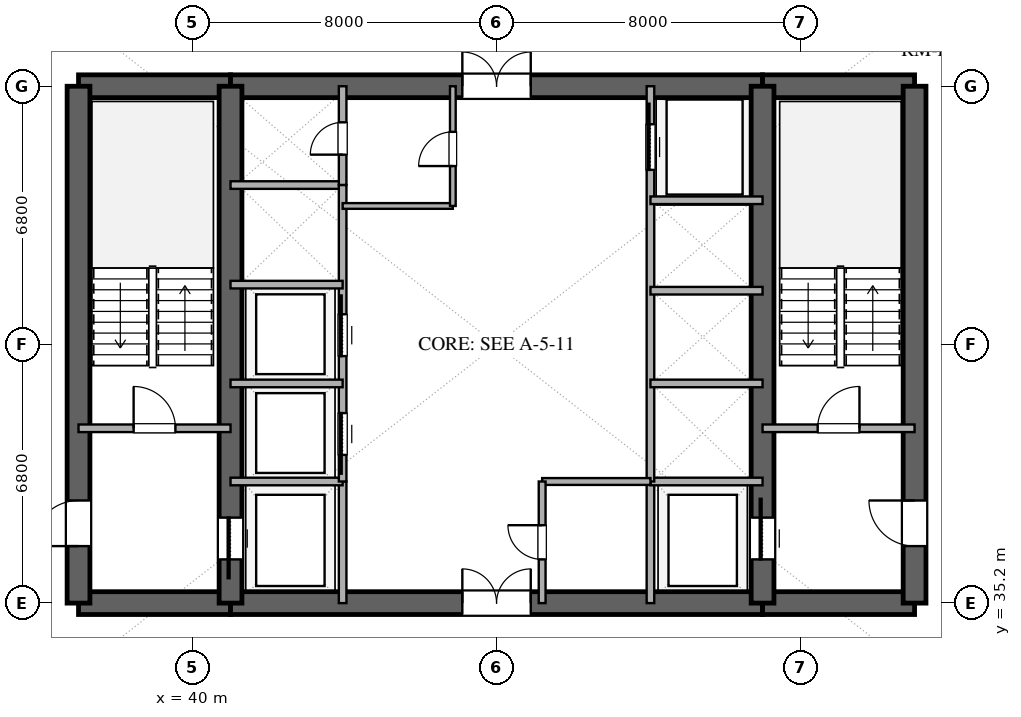
"""IFC4 building model, lengths in metres.
Left out: names, types, materials, properties, quantities, classifications, styles, units other than length and angle.
Written with IfcOpenShell. Run it as: python <this file> out.ifc"""

import sys

from ifc_helpers import new_model, si_unit, direction, frame, frame_2d, origin, place, context, subcontext, project, spatial, rectangle, extrude, element, fill, save


model = new_model("IFC4")
c1 = context("Model", 3, precision=1e-05, world=origin(), true_north=direction((0.0, 1.0)))
c2 = subcontext(c1, "Body", "Model", "MODEL_VIEW")
j1 = project(units=[si_unit("LENGTHUNIT", "METRE"), si_unit("PLANEANGLEUNIT", "RADIAN")], contexts=[c1])
p1 = place(None, origin())
s1 = spatial("IfcSite", under=j1, at=p1, CompositionType="ELEMENT")
p2 = place(p1, origin())
s2 = spatial("IfcBuilding", under=s1, at=p2, CompositionType="ELEMENT")
p3 = place(p2, frame((0.0, 0.0, 53.4)))
s3 = spatial("IfcBuildingStorey", under=s2, at=p3, CompositionType="ELEMENT", Elevation=53.4)
p4 = place(p3, frame((37.0, 35.2, 0.0), z_axis=(0.0, 0.0, 1.0), x_axis=(1.0, 0.0, 0.0)))
e1 = element("IfcWall", 1, at=p4, inside=s3, PredefinedType="SHEAR", context=c2, shape_type="SweptSolid", body=[
    extrude(rectangle(XDim=4.0, YDim=0.6, at=frame_2d((2.0, 0.0))), origin(), (0.0, 0.0, 1.0), 3.38),
])
p5 = place(p3, frame((41.0, 35.2, 0.0), z_axis=(0.0, 0.0, 1.0), x_axis=(1.0, 0.0, 0.0)))
e2 = element("IfcWall", 2, at=p5, inside=s3, PredefinedType="SHEAR", context=c2, shape_type="SweptSolid", body=[
    extrude(rectangle(XDim=14.0, YDim=0.6, at=frame_2d((7.0, 0.0))), origin(), (0.0, 0.0, 1.0), 3.38),
])
p6 = place(p5, frame((6.1, 0.0, 0.0)))
e3 = element("IfcOpeningElement", 3, at=p6, cuts=e2, PredefinedType="OPENING", context=c2, shape_type="SweptSolid", body=[
    extrude(rectangle(XDim=1.8, YDim=2.25, at=frame_2d((0.9, 1.125))), frame((0.0, 0.31, 0.0), z_axis=(0.0, -1.0, 0.0), x_axis=(1.0, 0.0, 0.0)), (0.0, 0.0, 1.0), 0.62),
])
for number, where, z_axis, x_axis in (
    (4, (55.0, 35.2, 0.0), (0.0, 0.0, 1.0), (1.0, 0.0, 0.0)),
    (5, (37.0, 48.8, 0.0), (0.0, 0.0, 1.0), (1.0, 0.0, 0.0)),
):
    element("IfcWall", number, at=place(p3, frame(where, z_axis=z_axis, x_axis=x_axis)), inside=s3, PredefinedType="SHEAR", context=c2, shape_type="SweptSolid", body=[
        extrude(rectangle(XDim=4.0, YDim=0.6, at=frame_2d((2.0, 0.0))), origin(), (0.0, 0.0, 1.0), 3.38),
    ])
p7 = place(p3, frame((41.0, 48.8, 0.0), z_axis=(0.0, 0.0, 1.0), x_axis=(1.0, 0.0, 0.0)))
e6 = element("IfcWall", 6, at=p7, inside=s3, PredefinedType="SHEAR", context=c2, shape_type="SweptSolid", body=[
    extrude(rectangle(XDim=14.0, YDim=0.6, at=frame_2d((7.0, 0.0))), origin(), (0.0, 0.0, 1.0), 3.38),
])
p8 = place(p7, frame((6.1, 0.0, 0.0)))
e7 = element("IfcOpeningElement", 7, at=p8, cuts=e6, PredefinedType="OPENING", context=c2, shape_type="SweptSolid", body=[
    extrude(rectangle(XDim=1.8, YDim=2.25, at=frame_2d((0.9, 1.125))), frame((0.0, 0.31, 0.0), z_axis=(0.0, -1.0, 0.0), x_axis=(1.0, 0.0, 0.0)), (0.0, 0.0, 1.0), 0.62),
])
p9 = place(p3, frame((55.0, 48.8, 0.0), z_axis=(0.0, 0.0, 1.0), x_axis=(1.0, 0.0, 0.0)))
e8 = element("IfcWall", 8, at=p9, inside=s3, PredefinedType="SHEAR", context=c2, shape_type="SweptSolid", body=[
    extrude(rectangle(XDim=4.0, YDim=0.6, at=frame_2d((2.0, 0.0))), origin(), (0.0, 0.0, 1.0), 3.38),
])
p10 = place(p3, frame((37.0, 35.2, 0.0), z_axis=(0.0, 0.0, 1.0), x_axis=(0.0, 1.0, 0.0)))
e9 = element("IfcWall", 9, at=p10, inside=s3, PredefinedType="SHEAR", context=c2, shape_type="SweptSolid", body=[
    extrude(rectangle(XDim=13.6, YDim=0.6, at=frame_2d((6.8, 0.0))), origin(), (0.0, 0.0, 1.0), 3.38),
])
p11 = place(p10, frame((1.5, 0.0, 0.0)))
e10 = element("IfcOpeningElement", 10, at=p11, cuts=e9, PredefinedType="OPENING", context=c2, shape_type="SweptSolid", body=[
    extrude(rectangle(XDim=1.2, YDim=2.15, at=frame_2d((0.6, 1.075))), frame((0.0, 0.31, 0.0), z_axis=(0.0, -1.0, 0.0), x_axis=(1.0, 0.0, 0.0)), (0.0, 0.0, 1.0), 0.62),
])
p12 = place(p3, frame((59.0, 35.2, 0.0), z_axis=(0.0, 0.0, 1.0), x_axis=(0.0, 1.0, 0.0)))
e11 = element("IfcWall", 11, at=p12, inside=s3, PredefinedType="SHEAR", context=c2, shape_type="SweptSolid", body=[
    extrude(rectangle(XDim=13.6, YDim=0.6, at=frame_2d((6.8, 0.0))), origin(), (0.0, 0.0, 1.0), 3.38),
])
p13 = place(p12, frame((1.5, 0.0, 0.0)))
e12 = element("IfcOpeningElement", 12, at=p13, cuts=e11, PredefinedType="OPENING", context=c2, shape_type="SweptSolid", body=[
    extrude(rectangle(XDim=1.2, YDim=2.15, at=frame_2d((0.6, 1.075))), frame((0.0, 0.31, 0.0), z_axis=(0.0, -1.0, 0.0), x_axis=(1.0, 0.0, 0.0)), (0.0, 0.0, 1.0), 0.62),
])
p14 = place(p3, frame((41.0, 35.2, 0.0), z_axis=(0.0, 0.0, 1.0), x_axis=(0.0, 1.0, 0.0)))
e13 = element("IfcWall", 13, at=p14, inside=s3, PredefinedType="SHEAR", context=c2, shape_type="SweptSolid", body=[
    extrude(rectangle(XDim=13.6, YDim=0.6, at=frame_2d((6.8, 0.0))), origin(), (0.0, 0.0, 1.0), 3.38),
])
p15 = place(p14, frame((1.15, 0.0, 0.0)))
e14 = element("IfcOpeningElement", 14, at=p15, cuts=e13, PredefinedType="OPENING", context=c2, shape_type="SweptSolid", body=[
    extrude(rectangle(XDim=1.1, YDim=2.2, at=frame_2d((0.55, 1.1))), frame((0.0, 0.31, 0.0), z_axis=(0.0, -1.0, 0.0), x_axis=(1.0, 0.0, 0.0)), (0.0, 0.0, 1.0), 0.62),
])
p16 = place(p3, frame((55.0, 35.2, 0.0), z_axis=(0.0, 0.0, 1.0), x_axis=(0.0, 1.0, 0.0)))
e15 = element("IfcWall", 15, at=p16, inside=s3, PredefinedType="SHEAR", context=c2, shape_type="SweptSolid", body=[
    extrude(rectangle(XDim=13.6, YDim=0.6, at=frame_2d((6.8, 0.0))), origin(), (0.0, 0.0, 1.0), 3.38),
])
p17 = place(p16, frame((1.15, 0.0, 0.0)))
e16 = element("IfcOpeningElement", 16, at=p17, cuts=e15, PredefinedType="OPENING", context=c2, shape_type="SweptSolid", body=[
    extrude(rectangle(XDim=1.1, YDim=2.2, at=frame_2d((0.55, 1.1))), frame((0.0, 0.31, 0.0), z_axis=(0.0, -1.0, 0.0), x_axis=(1.0, 0.0, 0.0)), (0.0, 0.0, 1.0), 0.62),
])
p18 = place(p3, frame((37.0, 39.8, 0.0), z_axis=(0.0, 0.0, 1.0), x_axis=(1.0, 0.0, 0.0)))
e17 = element("IfcWall", 17, at=p18, inside=s3, PredefinedType="SOLIDWALL", context=c2, shape_type="SweptSolid", body=[
    extrude(rectangle(XDim=4.0, YDim=0.2, at=frame_2d((2.0, 0.0))), origin(), (0.0, 0.0, 1.0), 2.74),
])
p19 = place(p18, frame((1.45, 0.0, 0.0)))
e18 = element("IfcOpeningElement", 18, at=p19, cuts=e17, PredefinedType="OPENING", context=c2, shape_type="SweptSolid", body=[
    extrude(rectangle(XDim=1.1, YDim=2.15, at=frame_2d((0.55, 1.075))), frame((0.0, 0.11, 0.0), z_axis=(0.0, -1.0, 0.0), x_axis=(1.0, 0.0, 0.0)), (0.0, 0.0, 1.0), 0.22),
])
p20 = place(p3, frame((55.0, 39.8, 0.0), z_axis=(0.0, 0.0, 1.0), x_axis=(1.0, 0.0, 0.0)))
e19 = element("IfcWall", 19, at=p20, inside=s3, PredefinedType="SOLIDWALL", context=c2, shape_type="SweptSolid", body=[
    extrude(rectangle(XDim=4.0, YDim=0.2, at=frame_2d((2.0, 0.0))), origin(), (0.0, 0.0, 1.0), 2.74),
])
p21 = place(p20, frame((1.45, 0.0, 0.0)))
e20 = element("IfcOpeningElement", 20, at=p21, cuts=e19, PredefinedType="OPENING", context=c2, shape_type="SweptSolid", body=[
    extrude(rectangle(XDim=1.1, YDim=2.15, at=frame_2d((0.55, 1.075))), frame((0.0, 0.11, 0.0), z_axis=(0.0, -1.0, 0.0), x_axis=(1.0, 0.0, 0.0)), (0.0, 0.0, 1.0), 0.22),
])
p22 = place(p3, frame((43.95, 35.2, 0.0), z_axis=(0.0, 0.0, 1.0), x_axis=(0.0, 1.0, 0.0)))
e21 = element("IfcWall", 21, at=p22, inside=s3, PredefinedType="SOLIDWALL", context=c2, shape_type="SweptSolid", body=[
    extrude(rectangle(XDim=3.2, YDim=0.2, at=frame_2d((1.6, 0.0))), origin(), (0.0, 0.0, 1.0), 2.74),
])
p23 = place(p3, frame((41.0, 38.4, 0.0), z_axis=(0.0, 0.0, 1.0), x_axis=(1.0, 0.0, 0.0)))
e22 = element("IfcWall", 22, at=p23, inside=s3, PredefinedType="SOLIDWALL", context=c2, shape_type="SweptSolid", body=[
    extrude(rectangle(XDim=2.95, YDim=0.2, at=frame_2d((1.475, 0.0))), origin(), (0.0, 0.0, 1.0), 2.74),
])
p24 = place(p3, frame((52.05, 35.2, 0.0), z_axis=(0.0, 0.0, 1.0), x_axis=(0.0, 1.0, 0.0)))
e23 = element("IfcWall", 23, at=p24, inside=s3, PredefinedType="SOLIDWALL", context=c2, shape_type="SweptSolid", body=[
    extrude(rectangle(XDim=3.2, YDim=0.2, at=frame_2d((1.6, 0.0))), origin(), (0.0, 0.0, 1.0), 2.74),
])
for number, where, z_axis, x_axis in (
    (24, (52.05, 38.4, 0.0), (0.0, 0.0, 1.0), (1.0, 0.0, 0.0)),
    (25, (41.0, 46.2, 0.0), (0.0, 0.0, 1.0), (1.0, 0.0, 0.0)),
):
    element("IfcWall", number, at=place(p3, frame(where, z_axis=z_axis, x_axis=x_axis)), inside=s3, PredefinedType="SOLIDWALL", context=c2, shape_type="SweptSolid", body=[
        extrude(rectangle(XDim=2.95, YDim=0.2, at=frame_2d((1.475, 0.0))), origin(), (0.0, 0.0, 1.0), 2.74),
    ])
p25 = place(p3, frame((43.95, 46.2, 0.0), z_axis=(0.0, 0.0, 1.0), x_axis=(0.0, 1.0, 0.0)))
e26 = element("IfcWall", 26, at=p25, inside=s3, PredefinedType="SOLIDWALL", context=c2, shape_type="SweptSolid", body=[
    extrude(rectangle(XDim=2.6, YDim=0.2, at=frame_2d((1.3, 0.0))), origin(), (0.0, 0.0, 1.0), 2.74),
])
p26 = place(p25, frame((0.8, 0.0, 0.0)))
e27 = element("IfcOpeningElement", 27, at=p26, cuts=e26, PredefinedType="OPENING", context=c2, shape_type="SweptSolid", body=[
    extrude(rectangle(XDim=0.85, YDim=2.15, at=frame_2d((0.425, 1.075))), frame((0.0, 0.11, 0.0), z_axis=(0.0, -1.0, 0.0), x_axis=(1.0, 0.0, 0.0)), (0.0, 0.0, 1.0), 0.22),
])
p27 = place(p3, frame((43.95, 38.4, 0.0), z_axis=(0.0, 0.0, 1.0), x_axis=(0.0, 1.0, 0.0)))
e28 = element("IfcWall", 28, at=p27, inside=s3, PredefinedType="SOLIDWALL", context=c2, shape_type="SweptSolid", body=[
    extrude(rectangle(XDim=7.8, YDim=0.2, at=frame_2d((3.9, 0.0))), origin(), (0.0, 0.0, 1.0), 2.74),
])
p28 = place(p27, frame((0.7, 0.0, 0.0)))
e29 = element("IfcOpeningElement", 29, at=p28, cuts=e28, PredefinedType="OPENING", context=c2, shape_type="SweptSolid", body=[
    extrude(rectangle(XDim=1.1, YDim=2.2, at=frame_2d((0.55, 1.1))), frame((0.0, 0.11, 0.0), z_axis=(0.0, -1.0, 0.0), x_axis=(1.0, 0.0, 0.0)), (0.0, 0.0, 1.0), 0.22),
])
p29 = place(p27, frame((3.3, 0.0, 0.0)))
e30 = element("IfcOpeningElement", 30, at=p29, cuts=e28, PredefinedType="OPENING", context=c2, shape_type="SweptSolid", body=[
    extrude(rectangle(XDim=1.1, YDim=2.2, at=frame_2d((0.55, 1.1))), frame((0.0, 0.11, 0.0), z_axis=(0.0, -1.0, 0.0), x_axis=(1.0, 0.0, 0.0)), (0.0, 0.0, 1.0), 0.22),
])
for number, where, z_axis, x_axis in (
    (31, (41.0, 40.98, 0.0), (0.0, 0.0, 1.0), (1.0, 0.0, 0.0)),
    (32, (41.0, 43.58, 0.0), (0.0, 0.0, 1.0), (1.0, 0.0, 0.0)),
):
    element("IfcWall", number, at=place(p3, frame(where, z_axis=z_axis, x_axis=x_axis)), inside=s3, PredefinedType="SOLIDWALL", context=c2, shape_type="SweptSolid", body=[
        extrude(rectangle(XDim=2.95, YDim=0.2, at=frame_2d((1.475, 0.0))), origin(), (0.0, 0.0, 1.0), 2.74),
    ])
p30 = place(p3, frame((52.05, 38.4, 0.0), z_axis=(0.0, 0.0, 1.0), x_axis=(0.0, 1.0, 0.0)))
e33 = element("IfcWall", 33, at=p30, inside=s3, PredefinedType="SOLIDWALL", context=c2, shape_type="SweptSolid", body=[
    extrude(rectangle(XDim=10.4, YDim=0.2, at=frame_2d((5.2, 0.0))), origin(), (0.0, 0.0, 1.0), 2.74),
])
p31 = place(p30, frame((8.2, 0.0, 0.0)))
e34 = element("IfcOpeningElement", 34, at=p31, cuts=e33, PredefinedType="OPENING", context=c2, shape_type="SweptSolid", body=[
    extrude(rectangle(XDim=1.2, YDim=2.2, at=frame_2d((0.6, 1.1))), frame((0.0, 0.11, 0.0), z_axis=(0.0, -1.0, 0.0), x_axis=(1.0, 0.0, 0.0)), (0.0, 0.0, 1.0), 0.22),
])
for number, where, z_axis, x_axis in (
    (35, (52.05, 40.98, 0.0), (0.0, 0.0, 1.0), (1.0, 0.0, 0.0)),
    (36, (52.05, 43.42, 0.0), (0.0, 0.0, 1.0), (1.0, 0.0, 0.0)),
    (37, (52.05, 45.8, 0.0), (0.0, 0.0, 1.0), (1.0, 0.0, 0.0)),
):
    element("IfcWall", number, at=place(p3, frame(where, z_axis=z_axis, x_axis=x_axis)), inside=s3, PredefinedType="SOLIDWALL", context=c2, shape_type="SweptSolid", body=[
        extrude(rectangle(XDim=2.95, YDim=0.2, at=frame_2d((1.475, 0.0))), origin(), (0.0, 0.0, 1.0), 2.74),
    ])
p32 = place(p3, frame((43.95, 45.65, 0.0), z_axis=(0.0, 0.0, 1.0), x_axis=(1.0, 0.0, 0.0)))
e38 = element("IfcWall", 38, at=p32, inside=s3, PredefinedType="PARTITIONING", context=c2, shape_type="SweptSolid", body=[
    extrude(rectangle(XDim=2.9, YDim=0.15, at=frame_2d((1.45, 0.0))), origin(), (0.0, 0.0, 1.0), 2.74),
])
p33 = place(p3, frame((46.85, 45.65, 0.0), z_axis=(0.0, 0.0, 1.0), x_axis=(0.0, 1.0, 0.0)))
e39 = element("IfcWall", 39, at=p33, inside=s3, PredefinedType="PARTITIONING", context=c2, shape_type="SweptSolid", body=[
    extrude(rectangle(XDim=3.15, YDim=0.15, at=frame_2d((1.575, 0.0))), origin(), (0.0, 0.0, 1.0), 2.74),
])
p34 = place(p33, frame((1.05, 0.0, 0.0)))
e40 = element("IfcOpeningElement", 40, at=p34, cuts=e39, PredefinedType="OPENING", context=c2, shape_type="SweptSolid", body=[
    extrude(rectangle(XDim=0.9, YDim=2.15, at=frame_2d((0.45, 1.075))), frame((0.0, 0.085, 0.0), z_axis=(0.0, -1.0, 0.0), x_axis=(1.0, 0.0, 0.0)), (0.0, 0.0, 1.0), 0.17),
])
p35 = place(p3, frame((49.2, 38.4, 0.0), z_axis=(0.0, 0.0, 1.0), x_axis=(1.0, 0.0, 0.0)))
e41 = element("IfcWall", 41, at=p35, inside=s3, PredefinedType="PLUMBINGWALL", context=c2, shape_type="SweptSolid", body=[
    extrude(rectangle(XDim=2.85, YDim=0.18, at=frame_2d((1.425, 0.0))), origin(), (0.0, 0.0, 1.0), 2.74),
])
p36 = place(p3, frame((49.2, 35.2, 0.0), z_axis=(0.0, 0.0, 1.0), x_axis=(0.0, 1.0, 0.0)))
e42 = element("IfcWall", 42, at=p36, inside=s3, PredefinedType="PLUMBINGWALL", context=c2, shape_type="SweptSolid", body=[
    extrude(rectangle(XDim=3.2, YDim=0.18, at=frame_2d((1.6, 0.0))), origin(), (0.0, 0.0, 1.0), 2.74),
])
p37 = place(p36, frame((1.15, 0.0, 0.0)))
e43 = element("IfcOpeningElement", 43, at=p37, cuts=e42, PredefinedType="OPENING", context=c2, shape_type="SweptSolid", body=[
    extrude(rectangle(XDim=0.9, YDim=2.1, at=frame_2d((0.45, 1.05))), frame((0.0, 0.1, 0.0), z_axis=(0.0, -1.0, 0.0), x_axis=(1.0, 0.0, 0.0)), (0.0, 0.0, 1.0), 0.2),
])
p38 = place(p15, origin())
e44 = element("IfcDoor", 44, at=p38, inside=s3, OperationType="SLIDING_TO_LEFT", PredefinedType="DOOR", context=c2, shape_type="SweptSolid", body=[
    extrude(rectangle(XDim=1.1, YDim=2.2, at=frame_2d((0.55, 1.1))), frame((0.0, 0.025, 0.0), z_axis=(0.0, -1.0, 0.0), x_axis=(1.0, 0.0, 0.0)), (0.0, 0.0, 1.0), 0.05),
])
fill(e14, e44)
p39 = place(p17, origin())
e45 = element("IfcDoor", 45, at=p39, inside=s3, OperationType="SLIDING_TO_RIGHT", PredefinedType="DOOR", context=c2, shape_type="SweptSolid", body=[
    extrude(rectangle(XDim=1.1, YDim=2.2, at=frame_2d((0.55, 1.1))), frame((0.0, 0.025, 0.0), z_axis=(0.0, -1.0, 0.0), x_axis=(1.0, 0.0, 0.0)), (0.0, 0.0, 1.0), 0.05),
])
fill(e16, e45)
p40 = place(p11, origin())
e46 = element("IfcDoor", 46, at=p40, inside=s3, OperationType="SINGLE_SWING_LEFT", PredefinedType="DOOR", context=c2, shape_type="SweptSolid", body=[
    extrude(rectangle(XDim=1.2, YDim=2.15, at=frame_2d((0.6, 1.075))), frame((0.0, 0.025, 0.0), z_axis=(0.0, -1.0, 0.0), x_axis=(1.0, 0.0, 0.0)), (0.0, 0.0, 1.0), 0.05),
])
fill(e10, e46)
p41 = place(p13, origin())
e47 = element("IfcDoor", 47, at=p41, inside=s3, OperationType="SINGLE_SWING_RIGHT", PredefinedType="DOOR", context=c2, shape_type="SweptSolid", body=[
    extrude(rectangle(XDim=1.2, YDim=2.15, at=frame_2d((0.6, 1.075))), frame((0.0, 0.025, 0.0), z_axis=(0.0, -1.0, 0.0), x_axis=(1.0, 0.0, 0.0)), (0.0, 0.0, 1.0), 0.05),
])
fill(e12, e47)
p42 = place(p6, origin())
e48 = element("IfcDoor", 48, at=p42, inside=s3, OperationType="DOUBLE_DOOR_SINGLE_SWING", PredefinedType="DOOR", context=c2, shape_type="SweptSolid", body=[
    extrude(rectangle(XDim=1.8, YDim=2.25, at=frame_2d((0.9, 1.125))), frame((0.0, 0.025, 0.0), z_axis=(0.0, -1.0, 0.0), x_axis=(1.0, 0.0, 0.0)), (0.0, 0.0, 1.0), 0.05),
])
fill(e3, e48)
p43 = place(p8, origin())
e49 = element("IfcDoor", 49, at=p43, inside=s3, OperationType="DOUBLE_DOOR_SINGLE_SWING", PredefinedType="DOOR", context=c2, shape_type="SweptSolid", body=[
    extrude(rectangle(XDim=1.8, YDim=2.25, at=frame_2d((0.9, 1.125))), frame((0.0, 0.025, 0.0), z_axis=(0.0, -1.0, 0.0), x_axis=(1.0, 0.0, 0.0)), (0.0, 0.0, 1.0), 0.05),
])
fill(e7, e49)
p44 = place(p19, origin())
e50 = element("IfcDoor", 50, at=p44, inside=s3, OperationType="SINGLE_SWING_LEFT", PredefinedType="DOOR", context=c2, shape_type="SweptSolid", body=[
    extrude(rectangle(XDim=1.1, YDim=2.15, at=frame_2d((0.55, 1.075))), frame((0.0, 0.025, 0.0), z_axis=(0.0, -1.0, 0.0), x_axis=(1.0, 0.0, 0.0)), (0.0, 0.0, 1.0), 0.05),
])
fill(e18, e50)
p45 = place(p21, origin())
e51 = element("IfcDoor", 51, at=p45, inside=s3, OperationType="SINGLE_SWING_RIGHT", PredefinedType="DOOR", context=c2, shape_type="SweptSolid", body=[
    extrude(rectangle(XDim=1.1, YDim=2.15, at=frame_2d((0.55, 1.075))), frame((0.0, 0.025, 0.0), z_axis=(0.0, -1.0, 0.0), x_axis=(1.0, 0.0, 0.0)), (0.0, 0.0, 1.0), 0.05),
])
fill(e20, e51)
p46 = place(p26, origin())
e52 = element("IfcDoor", 52, at=p46, inside=s3, OperationType="SINGLE_SWING_LEFT", PredefinedType="DOOR", context=c2, shape_type="SweptSolid", body=[
    extrude(rectangle(XDim=0.85, YDim=2.15, at=frame_2d((0.425, 1.075))), frame((0.0, 0.025, 0.0), z_axis=(0.0, -1.0, 0.0), x_axis=(1.0, 0.0, 0.0)), (0.0, 0.0, 1.0), 0.05),
])
fill(e27, e52)
p47 = place(p28, origin())
e53 = element("IfcDoor", 53, at=p47, inside=s3, OperationType="SLIDING_TO_LEFT", PredefinedType="DOOR", context=c2, shape_type="SweptSolid", body=[
    extrude(rectangle(XDim=1.1, YDim=2.2, at=frame_2d((0.55, 1.1))), frame((0.0, 0.025, 0.0), z_axis=(0.0, -1.0, 0.0), x_axis=(1.0, 0.0, 0.0)), (0.0, 0.0, 1.0), 0.05),
])
fill(e29, e53)
p48 = place(p29, origin())
e54 = element("IfcDoor", 54, at=p48, inside=s3, OperationType="SLIDING_TO_RIGHT", PredefinedType="DOOR", context=c2, shape_type="SweptSolid", body=[
    extrude(rectangle(XDim=1.1, YDim=2.2, at=frame_2d((0.55, 1.1))), frame((0.0, 0.025, 0.0), z_axis=(0.0, -1.0, 0.0), x_axis=(1.0, 0.0, 0.0)), (0.0, 0.0, 1.0), 0.05),
])
fill(e30, e54)
p49 = place(p31, origin())
e55 = element("IfcDoor", 55, at=p49, inside=s3, OperationType="SLIDING_TO_RIGHT", PredefinedType="DOOR", context=c2, shape_type="SweptSolid", body=[
    extrude(rectangle(XDim=1.2, YDim=2.2, at=frame_2d((0.6, 1.1))), frame((0.0, 0.025, 0.0), z_axis=(0.0, -1.0, 0.0), x_axis=(1.0, 0.0, 0.0)), (0.0, 0.0, 1.0), 0.05),
])
fill(e34, e55)
p50 = place(p34, origin())
e56 = element("IfcDoor", 56, at=p50, inside=s3, OperationType="SINGLE_SWING_LEFT", PredefinedType="DOOR", context=c2, shape_type="SweptSolid", body=[
    extrude(rectangle(XDim=0.9, YDim=2.15, at=frame_2d((0.45, 1.075))), frame((0.0, 0.025, 0.0), z_axis=(0.0, -1.0, 0.0), x_axis=(1.0, 0.0, 0.0)), (0.0, 0.0, 1.0), 0.05),
])
fill(e40, e56)
p51 = place(p37, origin())
e57 = element("IfcDoor", 57, at=p51, inside=s3, OperationType="SINGLE_SWING_RIGHT", PredefinedType="DOOR", context=c2, shape_type="SweptSolid", body=[
    extrude(rectangle(XDim=0.9, YDim=2.1, at=frame_2d((0.45, 1.05))), frame((0.0, 0.025, 0.0), z_axis=(0.0, -1.0, 0.0), x_axis=(1.0, 0.0, 0.0)), (0.0, 0.0, 1.0), 0.05),
])
fill(e43, e57)
save(model, sys.argv[1])
